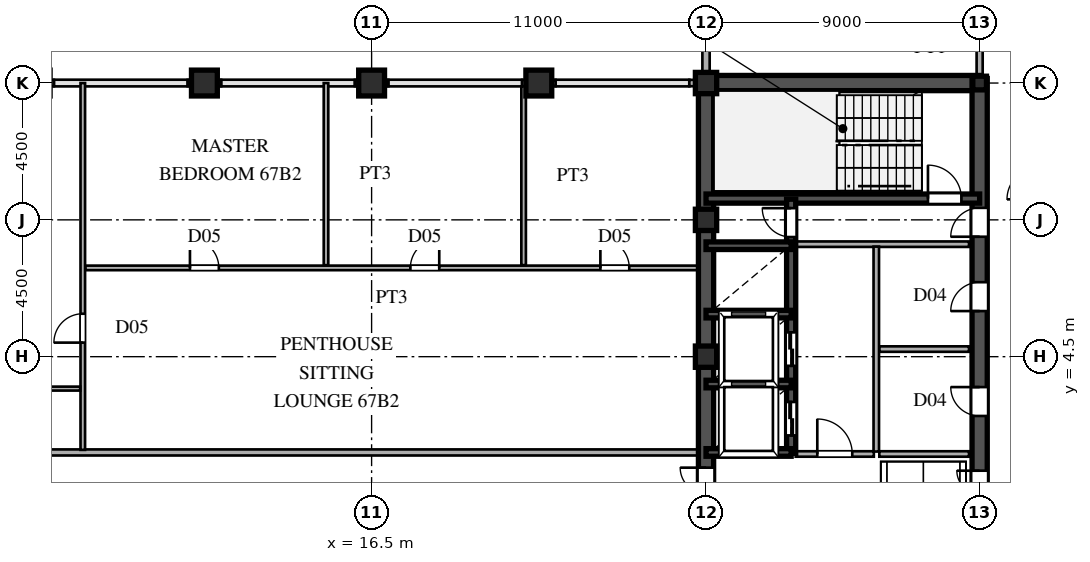
"""IFC4 building model, lengths in metres.
Left out: names, types, materials, properties, quantities, classifications, styles, units other than length and angle.
Written with IfcOpenShell. Run it as: python <this file> out.ifc"""

import sys

from ifc_helpers import new_model, si_unit, direction, frame, frame_2d, origin, origin_2d, place, context, subcontext, project, spatial, rectangle, hollow_rectangle, i_section, extrude, source, transform, mapped, element, fill, save


model = new_model("IFC4")
c1 = context("Model", 3, precision=1e-05, world=origin(), true_north=direction((0.0, 1.0)))
c2 = subcontext(c1, "Body", "Model", "MODEL_VIEW")
j1 = project(units=[si_unit("LENGTHUNIT", "METRE"), si_unit("PLANEANGLEUNIT", "RADIAN")], contexts=[c1])
p1 = place(None, origin())
s1 = spatial("IfcSite", under=j1, at=p1, CompositionType="ELEMENT")
p2 = place(p1, origin())
s2 = spatial("IfcBuilding", under=s1, at=p2, CompositionType="ELEMENT")
p3 = place(p2, frame((0.0, 0.0, 254.4)))
s3 = spatial("IfcBuildingStorey", under=s2, at=p3, CompositionType="ELEMENT", Elevation=254.4)
m1 = source(origin(), c2, "Body", "SweptSolid", [
    extrude(hollow_rectangle(XDim=0.7, YDim=0.7, WallThickness=0.03, at=origin_2d()), origin(), (0.0, 0.0, 1.0), 3.75),
])
for number, where, z_axis, x_axis in (
    (1, (27.5, 4.5, 0.0), (0.0, 0.0, 1.0), (1.0, 0.0, 0.0)),
    (2, (27.5, 9.0, 0.0), (0.0, 0.0, 1.0), (1.0, 0.0, 0.0)),
    (3, (27.5, 13.5, 0.0), (0.0, 0.0, 1.0), (1.0, 0.0, 0.0)),
):
    element("IfcColumn", number, at=place(p3, frame(where, z_axis=z_axis, x_axis=x_axis)), inside=s3, PredefinedType="COLUMN", context=c2, shape_type="MappedRepresentation", body=[
        mapped(m1, transform((0.0, 0.0, 0.0), scale=1.0)),
    ])
m2 = source(origin(), c2, "Body", "SweptSolid", [
    extrude(i_section(OverallWidth=0.45, OverallDepth=0.45, WebThickness=0.016, FlangeThickness=0.025, at=origin_2d()), origin(), (0.0, 0.0, 1.0), 3.75),
])
p4 = place(p3, frame((36.5, 13.5, 0.0), z_axis=(0.0, 0.0, 1.0), x_axis=(1.0, 0.0, 0.0)))
e4 = element("IfcColumn", 4, at=p4, inside=s3, PredefinedType="COLUMN", context=c2, shape_type="MappedRepresentation", body=[
    mapped(m2, transform((0.0, 0.0, 0.0), scale=1.0)),
])
m3 = source(origin(), c2, "Body", "SweptSolid", [
    extrude(hollow_rectangle(XDim=0.85, YDim=0.85, WallThickness=0.036, at=origin_2d()), origin(), (0.0, 0.0, 1.0), 3.75),
])
for number, where, z_axis, x_axis in (
    (5, (11.0, 13.5, 0.0), (0.0, 0.0, 1.0), (1.0, 0.0, 0.0)),
    (6, (16.5, 13.5, 0.0), (0.0, 0.0, 1.0), (1.0, 0.0, 0.0)),
    (7, (22.0, 13.5, 0.0), (0.0, 0.0, 1.0), (1.0, 0.0, 0.0)),
):
    element("IfcColumn", number, at=place(p3, frame(where, z_axis=z_axis, x_axis=x_axis)), inside=s3, PredefinedType="COLUMN", context=c2, shape_type="MappedRepresentation", body=[
        mapped(m3, transform((0.0, 0.0, 0.0), scale=1.0)),
    ])
p5 = place(p3, frame((27.5, 13.755, 0.0), z_axis=(0.0, 0.0, 1.0), x_axis=(0.0, 1.0, 0.0)))
e8 = element("IfcWall", 8, at=p5, inside=s3, PredefinedType="SOLIDWALL", context=c2, shape_type="SweptSolid", body=[
    extrude(rectangle(XDim=0.62, YDim=0.24, at=frame_2d((0.31, 0.0))), origin(), (0.0, 0.0, 1.0), 3.03),
])
p6 = place(p3, frame((27.5, 14.375, 0.0), z_axis=(0.0, 0.0, 1.0), x_axis=(0.0, 1.0, 0.0)))
e9 = element("IfcWall", 9, at=p6, inside=s3, PredefinedType="SOLIDWALL", context=c2, shape_type="SweptSolid", body=[
    extrude(rectangle(XDim=1.605, YDim=0.24, at=frame_2d((0.803, 0.0))), origin(), (0.0, 0.0, 1.0), 3.53),
])
for number, where, z_axis, x_axis in (
    (10, (4.95, 13.5, 0.0), (0.0, 0.0, 1.0), (1.0, 0.0, 0.0)),
    (11, (10.45, 13.5, 0.0), (0.0, 0.0, 1.0), (1.0, 0.0, 0.0)),
    (12, (15.95, 13.5, 0.0), (0.0, 0.0, 1.0), (1.0, 0.0, 0.0)),
    (13, (21.45, 13.5, 0.0), (0.0, 0.0, 1.0), (1.0, 0.0, 0.0)),
):
    element("IfcWall", number, at=place(p3, frame(where, z_axis=z_axis, x_axis=x_axis)), inside=s3, PredefinedType="SOLIDWALL", context=c2, shape_type="SweptSolid", body=[
        extrude(rectangle(XDim=1.1, YDim=0.21, at=frame_2d((0.55, 0.0))), origin(), (0.0, 0.0, 1.0), 3.03),
    ])
p7 = place(p3, frame((26.95, 13.5, 0.0), z_axis=(0.0, 0.0, 1.0), x_axis=(1.0, 0.0, 0.0)))
e14 = element("IfcWall", 14, at=p7, inside=s3, PredefinedType="SOLIDWALL", context=c2, shape_type="SweptSolid", body=[
    extrude(rectangle(XDim=0.54, YDim=0.21, at=frame_2d((0.27, 0.0))), origin(), (0.0, 0.0, 1.0), 3.03),
])
p8 = place(p3, frame((27.5, 1.3, 0.0), z_axis=(0.0, 0.0, 1.0), x_axis=(0.0, 1.0, 0.0)))
e15 = element("IfcWall", 15, at=p8, inside=s3, PredefinedType="SHEAR", context=c2, shape_type="SweptSolid", body=[
    extrude(rectangle(XDim=12.2, YDim=0.5, at=frame_2d((6.1, 0.0))), origin(), (0.0, 0.0, 1.0), 3.53),
])
p9 = place(p3, frame((27.5, -1.3, 0.0), z_axis=(0.0, 0.0, 1.0), x_axis=(0.0, 1.0, 0.0)))
e16 = element("IfcWall", 16, at=p9, inside=s3, PredefinedType="SHEAR", context=c2, shape_type="SweptSolid", body=[
    extrude(rectangle(XDim=2.6, YDim=0.5, at=frame_2d((1.3, 0.0))), origin(), (0.0, 0.0, 1.0), 3.53),
])
p10 = place(p9, frame((0.45, 0.0, 0.0)))
e17 = element("IfcOpeningElement", 17, at=p10, cuts=e16, PredefinedType="OPENING", context=c2, shape_type="SweptSolid", body=[
    extrude(rectangle(XDim=1.7, YDim=2.35, at=frame_2d((0.85, 1.175))), frame((0.0, 0.26, 0.0), z_axis=(0.0, -1.0, 0.0), x_axis=(1.0, 0.0, 0.0)), (0.0, 0.0, 1.0), 0.52),
])
p11 = place(p3, frame((27.5, 13.5, 0.0), z_axis=(0.0, 0.0, 1.0), x_axis=(1.0, 0.0, 0.0)))
e18 = element("IfcWall", 18, at=p11, inside=s3, PredefinedType="SHEAR", context=c2, shape_type="SweptSolid", body=[
    extrude(rectangle(XDim=9.0, YDim=0.5, at=frame_2d((4.5, 0.0))), origin(), (0.0, 0.0, 1.0), 3.53),
])
p12 = place(p3, frame((36.5, -1.3, 0.0), z_axis=(0.0, 0.0, 1.0), x_axis=(0.0, 1.0, 0.0)))
e19 = element("IfcWall", 19, at=p12, inside=s3, PredefinedType="SHEAR", context=c2, shape_type="SweptSolid", body=[
    extrude(rectangle(XDim=2.6, YDim=0.5, at=frame_2d((1.3, 0.0))), origin(), (0.0, 0.0, 1.0), 3.53),
])
p13 = place(p12, frame((0.55, 0.0, 0.0)))
e20 = element("IfcOpeningElement", 20, at=p13, cuts=e19, PredefinedType="OPENING", context=c2, shape_type="SweptSolid", body=[
    extrude(rectangle(XDim=1.5, YDim=2.3, at=frame_2d((0.75, 1.15))), frame((0.0, 0.26, 0.0), z_axis=(0.0, -1.0, 0.0), x_axis=(1.0, 0.0, 0.0)), (0.0, 0.0, 1.0), 0.52),
])
p14 = place(p3, frame((36.5, 8.2, 0.0), z_axis=(0.0, 0.0, 1.0), x_axis=(0.0, 1.0, 0.0)))
e21 = element("IfcWall", 21, at=p14, inside=s3, PredefinedType="SHEAR", context=c2, shape_type="SweptSolid", body=[
    extrude(rectangle(XDim=5.45, YDim=0.5, at=frame_2d((2.725, 0.0))), origin(), (0.0, 0.0, 1.0), 3.53),
])
p15 = place(p14, frame((0.245, 0.0, 0.0)))
e22 = element("IfcOpeningElement", 22, at=p15, cuts=e21, PredefinedType="OPENING", context=c2, shape_type="SweptSolid", body=[
    extrude(rectangle(XDim=0.95, YDim=2.15, at=frame_2d((0.475, 1.075))), frame((0.0, 0.26, 0.0), z_axis=(0.0, -1.0, 0.0), x_axis=(1.0, 0.0, 0.0)), (0.0, 0.0, 1.0), 0.52),
])
p16 = place(p3, frame((36.5, 1.3, 0.0), z_axis=(0.0, 0.0, 1.0), x_axis=(0.0, 1.0, 0.0)))
e23 = element("IfcWall", 23, at=p16, inside=s3, PredefinedType="SHEAR", context=c2, shape_type="SweptSolid", body=[
    extrude(rectangle(XDim=3.45, YDim=0.5, at=frame_2d((1.725, 0.0))), origin(), (0.0, 0.0, 1.0), 3.53),
])
p17 = place(p16, frame((1.25, 0.0, 0.0)))
e24 = element("IfcOpeningElement", 24, at=p17, cuts=e23, PredefinedType="OPENING", context=c2, shape_type="SweptSolid", body=[
    extrude(rectangle(XDim=0.95, YDim=2.15, at=frame_2d((0.475, 1.075))), frame((0.0, 0.26, 0.0), z_axis=(0.0, -1.0, 0.0), x_axis=(1.0, 0.0, 0.0)), (0.0, 0.0, 1.0), 0.52),
])
p18 = place(p3, frame((36.5, 4.75, 0.0), z_axis=(0.0, 0.0, 1.0), x_axis=(0.0, 1.0, 0.0)))
e25 = element("IfcWall", 25, at=p18, inside=s3, PredefinedType="SHEAR", context=c2, shape_type="SweptSolid", body=[
    extrude(rectangle(XDim=3.45, YDim=0.5, at=frame_2d((1.725, 0.0))), origin(), (0.0, 0.0, 1.0), 3.53),
])
p19 = place(p18, frame((1.25, 0.0, 0.0)))
e26 = element("IfcOpeningElement", 26, at=p19, cuts=e25, PredefinedType="OPENING", context=c2, shape_type="SweptSolid", body=[
    extrude(rectangle(XDim=0.95, YDim=2.15, at=frame_2d((0.475, 1.075))), frame((0.0, 0.26, 0.0), z_axis=(0.0, -1.0, 0.0), x_axis=(1.0, 0.0, 0.0)), (0.0, 0.0, 1.0), 0.52),
])
p20 = place(p3, frame((27.5, 9.7, 0.0), z_axis=(0.0, 0.0, 1.0), x_axis=(1.0, 0.0, 0.0)))
e27 = element("IfcWall", 27, at=p20, inside=s3, PredefinedType="SHEAR", context=c2, shape_type="SweptSolid", body=[
    extrude(rectangle(XDim=9.0, YDim=0.3, at=frame_2d((4.5, 0.0))), origin(), (0.0, 0.0, 1.0), 3.53),
])
p21 = place(p20, frame((7.3, 0.0, 0.0)))
e28 = element("IfcOpeningElement", 28, at=p21, cuts=e27, PredefinedType="OPENING", context=c2, shape_type="SweptSolid", body=[
    extrude(rectangle(XDim=1.1, YDim=2.2, at=frame_2d((0.55, 1.1))), frame((0.0, 0.16, 0.0), z_axis=(0.0, -1.0, 0.0), x_axis=(1.0, 0.0, 0.0)), (0.0, 0.0, 1.0), 0.32),
])
for number, where, z_axis, x_axis in (
    (29, (27.5, 1.35, 0.0), (0.0, 0.0, 1.0), (1.0, 0.0, 0.0)),
    (30, (27.5, 3.6, 0.0), (0.0, 0.0, 1.0), (1.0, 0.0, 0.0)),
    (31, (27.5, 5.9, 0.0), (0.0, 0.0, 1.0), (1.0, 0.0, 0.0)),
    (32, (27.5, 8.15, 0.0), (0.0, 0.0, 1.0), (1.0, 0.0, 0.0)),
):
    element("IfcWall", number, at=place(p3, frame(where, z_axis=z_axis, x_axis=x_axis)), inside=s3, PredefinedType="SHEAR", context=c2, shape_type="SweptSolid", body=[
        extrude(rectangle(XDim=2.8, YDim=0.25, at=frame_2d((1.4, 0.0))), origin(), (0.0, 0.0, 1.0), 3.53),
    ])
p22 = place(p3, frame((30.3, 1.32, 0.0), z_axis=(0.0, 0.0, 1.0), x_axis=(0.0, 1.0, 0.0)))
e33 = element("IfcWall", 33, at=p22, inside=s3, PredefinedType="SHEAR", context=c2, shape_type="SweptSolid", body=[
    extrude(rectangle(XDim=2.28, YDim=0.3, at=frame_2d((1.14, 0.0))), origin(), (0.0, 0.0, 1.0), 3.53),
])
p23 = place(p22, frame((0.59, 0.0, 0.0)))
e34 = element("IfcOpeningElement", 34, at=p23, cuts=e33, PredefinedType="OPENING", context=c2, shape_type="SweptSolid", body=[
    extrude(rectangle(XDim=1.1, YDim=2.2, at=frame_2d((0.55, 1.1))), frame((0.0, 0.16, 0.0), z_axis=(0.0, -1.0, 0.0), x_axis=(1.0, 0.0, 0.0)), (0.0, 0.0, 1.0), 0.32),
])
p24 = place(p3, frame((30.3, 3.6, 0.0), z_axis=(0.0, 0.0, 1.0), x_axis=(0.0, 1.0, 0.0)))
e35 = element("IfcWall", 35, at=p24, inside=s3, PredefinedType="SHEAR", context=c2, shape_type="SweptSolid", body=[
    extrude(rectangle(XDim=2.3, YDim=0.3, at=frame_2d((1.15, 0.0))), origin(), (0.0, 0.0, 1.0), 3.53),
])
p25 = place(p24, frame((0.6, 0.0, 0.0)))
e36 = element("IfcOpeningElement", 36, at=p25, cuts=e35, PredefinedType="OPENING", context=c2, shape_type="SweptSolid", body=[
    extrude(rectangle(XDim=1.1, YDim=2.2, at=frame_2d((0.55, 1.1))), frame((0.0, 0.16, 0.0), z_axis=(0.0, -1.0, 0.0), x_axis=(1.0, 0.0, 0.0)), (0.0, 0.0, 1.0), 0.32),
])
p26 = place(p3, frame((30.3, 5.9, 0.0), z_axis=(0.0, 0.0, 1.0), x_axis=(0.0, 1.0, 0.0)))
e37 = element("IfcWall", 37, at=p26, inside=s3, PredefinedType="SHEAR", context=c2, shape_type="SweptSolid", body=[
    extrude(rectangle(XDim=2.25, YDim=0.3, at=frame_2d((1.125, 0.0))), origin(), (0.0, 0.0, 1.0), 3.53),
])
p27 = place(p3, frame((30.3, 8.15, 0.0), z_axis=(0.0, 0.0, 1.0), x_axis=(0.0, 1.0, 0.0)))
e38 = element("IfcWall", 38, at=p27, inside=s3, PredefinedType="SHEAR", context=c2, shape_type="SweptSolid", body=[
    extrude(rectangle(XDim=1.53, YDim=0.3, at=frame_2d((0.765, 0.0))), origin(), (0.0, 0.0, 1.0), 3.53),
])
p28 = place(p27, frame((0.285, 0.0, 0.0)))
e39 = element("IfcOpeningElement", 39, at=p28, cuts=e38, PredefinedType="OPENING", context=c2, shape_type="SweptSolid", body=[
    extrude(rectangle(XDim=0.95, YDim=2.15, at=frame_2d((0.475, 1.075))), frame((0.0, 0.16, 0.0), z_axis=(0.0, -1.0, 0.0), x_axis=(1.0, 0.0, 0.0)), (0.0, 0.0, 1.0), 0.32),
])
p29 = place(p3, frame((30.45, 8.2, 0.0), z_axis=(0.0, 0.0, 1.0), x_axis=(1.0, 0.0, 0.0)))
e40 = element("IfcWall", 40, at=p29, inside=s3, PredefinedType="PARTITIONING", context=c2, shape_type="SweptSolid", body=[
    extrude(rectangle(XDim=5.7, YDim=0.18, at=frame_2d((2.85, 0.0))), origin(), (0.0, 0.0, 1.0), 3.53),
])
p30 = place(p3, frame((33.1, 1.38, 0.0), z_axis=(0.0, 0.0, 1.0), x_axis=(0.0, 1.0, 0.0)))
e41 = element("IfcWall", 41, at=p30, inside=s3, PredefinedType="PARTITIONING", context=c2, shape_type="SweptSolid", body=[
    extrude(rectangle(XDim=6.74, YDim=0.18, at=frame_2d((3.37, 0.0))), origin(), (0.0, 0.0, 1.0), 3.53),
])
p31 = place(p3, frame((30.45, 1.3, 0.0), z_axis=(0.0, 0.0, 1.0), x_axis=(1.0, 0.0, 0.0)))
e42 = element("IfcWall", 42, at=p31, inside=s3, PredefinedType="PARTITIONING", context=c2, shape_type="SweptSolid", body=[
    extrude(rectangle(XDim=2.57, YDim=0.18, at=frame_2d((1.285, 0.0))), origin(), (0.0, 0.0, 1.0), 3.53),
])
p32 = place(p31, frame((0.71, 0.0, 0.0)))
e43 = element("IfcOpeningElement", 43, at=p32, cuts=e42, PredefinedType="OPENING", context=c2, shape_type="SweptSolid", body=[
    extrude(rectangle(XDim=1.15, YDim=2.2, at=frame_2d((0.575, 1.1))), frame((0.0, 0.1, 0.0), z_axis=(0.0, -1.0, 0.0), x_axis=(1.0, 0.0, 0.0)), (0.0, 0.0, 1.0), 0.2),
])
for number, where, z_axis, x_axis in (
    (44, (33.2, 1.3, 0.0), (0.0, 0.0, 1.0), (1.0, 0.0, 0.0)),
    (45, (33.2, 4.75, 0.0), (0.0, 0.0, 1.0), (1.0, 0.0, 0.0)),
):
    element("IfcWall", number, at=place(p3, frame(where, z_axis=z_axis, x_axis=x_axis)), inside=s3, PredefinedType="PARTITIONING", context=c2, shape_type="SweptSolid", body=[
        extrude(rectangle(XDim=2.95, YDim=0.18, at=frame_2d((1.475, 0.0))), origin(), (0.0, 0.0, 1.0), 3.53),
    ])
p33 = place(p3, frame((-27.245, 1.35, 0.0), z_axis=(0.0, 0.0, 1.0), x_axis=(1.0, 0.0, 0.0)))
e46 = element("IfcWall", 46, at=p33, inside=s3, PredefinedType="PARTITIONING", context=c2, shape_type="SweptSolid", body=[
    extrude(rectangle(XDim=54.49, YDim=0.2, at=frame_2d((27.245, 0.0))), origin(), (0.0, 0.0, 1.0), 3.53),
])
p34 = place(p33, frame((24.97, 0.0, 0.0)))
e47 = element("IfcOpeningElement", 47, at=p34, cuts=e46, PredefinedType="OPENING", context=c2, shape_type="SweptSolid", body=[
    extrude(rectangle(XDim=1.05, YDim=2.25, at=frame_2d((0.525, 1.125))), frame((0.0, 0.11, 0.0), z_axis=(0.0, -1.0, 0.0), x_axis=(1.0, 0.0, 0.0)), (0.0, 0.0, 1.0), 0.22),
])
p35 = place(p3, frame((1.585, 3.45, 0.0), z_axis=(0.0, 0.0, 1.0), x_axis=(1.0, 0.0, 0.0)))
e48 = element("IfcWall", 48, at=p35, inside=s3, PredefinedType="PARTITIONING", context=c2, shape_type="SweptSolid", body=[
    extrude(rectangle(XDim=5.33, YDim=0.13, at=frame_2d((2.665, 0.0))), origin(), (0.0, 0.0, 1.0), 3.53),
])
p36 = place(p3, frame((7.085, 7.42, 0.0), z_axis=(0.0, 0.0, 1.0), x_axis=(1.0, 0.0, 0.0)))
e49 = element("IfcWall", 49, at=p36, inside=s3, PredefinedType="PARTITIONING", context=c2, shape_type="SweptSolid", body=[
    extrude(rectangle(XDim=20.16, YDim=0.15, at=frame_2d((10.08, 0.0))), origin(), (0.0, 0.0, 1.0), 3.53),
])
p37 = place(p36, frame((3.44, 0.0, 0.0)))
e50 = element("IfcOpeningElement", 50, at=p37, cuts=e49, PredefinedType="OPENING", context=c2, shape_type="SweptSolid", body=[
    extrude(rectangle(XDim=0.95, YDim=2.15, at=frame_2d((0.475, 1.075))), frame((0.0, 0.085, 0.0), z_axis=(0.0, -1.0, 0.0), x_axis=(1.0, 0.0, 0.0)), (0.0, 0.0, 1.0), 0.17),
])
p38 = place(p36, frame((10.69, 0.0, 0.0)))
e51 = element("IfcOpeningElement", 51, at=p38, cuts=e49, PredefinedType="OPENING", context=c2, shape_type="SweptSolid", body=[
    extrude(rectangle(XDim=0.95, YDim=2.15, at=frame_2d((0.475, 1.075))), frame((0.0, 0.085, 0.0), z_axis=(0.0, -1.0, 0.0), x_axis=(1.0, 0.0, 0.0)), (0.0, 0.0, 1.0), 0.17),
])
p39 = place(p36, frame((16.94, 0.0, 0.0)))
e52 = element("IfcOpeningElement", 52, at=p39, cuts=e49, PredefinedType="OPENING", context=c2, shape_type="SweptSolid", body=[
    extrude(rectangle(XDim=0.95, YDim=2.15, at=frame_2d((0.475, 1.075))), frame((0.0, 0.085, 0.0), z_axis=(0.0, -1.0, 0.0), x_axis=(1.0, 0.0, 0.0)), (0.0, 0.0, 1.0), 0.17),
])
p40 = place(p3, frame((7.0, 1.435, 0.0), z_axis=(0.0, 0.0, 1.0), x_axis=(0.0, 1.0, 0.0)))
e53 = element("IfcWall", 53, at=p40, inside=s3, PredefinedType="PARTITIONING", context=c2, shape_type="SweptSolid", body=[
    extrude(rectangle(XDim=12.065, YDim=0.15, at=frame_2d((6.032, 0.0))), origin(), (0.0, 0.0, 1.0), 3.53),
])
p41 = place(p40, frame((3.528, 0.0, 0.0)))
e54 = element("IfcOpeningElement", 54, at=p41, cuts=e53, PredefinedType="OPENING", context=c2, shape_type="SweptSolid", body=[
    extrude(rectangle(XDim=0.95, YDim=2.15, at=frame_2d((0.475, 1.075))), frame((0.0, 0.085, 0.0), z_axis=(0.0, -1.0, 0.0), x_axis=(1.0, 0.0, 0.0)), (0.0, 0.0, 1.0), 0.17),
])
p42 = place(p3, frame((15.0, 7.51, 0.0), z_axis=(0.0, 0.0, 1.0), x_axis=(0.0, 1.0, 0.0)))
e55 = element("IfcWall", 55, at=p42, inside=s3, PredefinedType="PARTITIONING", context=c2, shape_type="SweptSolid", body=[
    extrude(rectangle(XDim=5.99, YDim=0.15, at=frame_2d((2.995, 0.0))), origin(), (0.0, 0.0, 1.0), 3.53),
])
p43 = place(p3, frame((21.5, 7.51, 0.0), z_axis=(0.0, 0.0, 1.0), x_axis=(0.0, 1.0, 0.0)))
e56 = element("IfcWall", 56, at=p43, inside=s3, PredefinedType="PARTITIONING", context=c2, shape_type="SweptSolid", body=[
    extrude(rectangle(XDim=5.88, YDim=0.15, at=frame_2d((2.94, 0.0))), origin(), (0.0, 0.0, 1.0), 3.53),
])
p44 = place(p3, frame((36.5, 13.755, 0.0), z_axis=(0.0, 0.0, 1.0), x_axis=(0.0, 1.0, 0.0)))
e57 = element("IfcWall", 57, at=p44, inside=s3, PredefinedType="PARTITIONING", context=c2, shape_type="SweptSolid", body=[
    extrude(rectangle(XDim=1.76, YDim=0.2, at=frame_2d((0.88, 0.0))), origin(), (0.0, 0.0, 1.0), 2.93),
])
m4 = source(origin(), c2, "Body", "SweptSolid", [
    extrude(rectangle(XDim=1.7, YDim=2.35, at=frame_2d((0.85, 1.175))), frame((0.0, 0.025, 0.0), z_axis=(0.0, -1.0, 0.0), x_axis=(1.0, 0.0, 0.0)), (0.0, 0.0, 1.0), 0.05),
])
p45 = place(p10, origin())
e58 = element("IfcDoor", 58, at=p45, inside=s3, OperationType="DOUBLE_SWING_LEFT", PredefinedType="DOOR", context=c2, shape_type="MappedRepresentation", body=[
    mapped(m4, transform((0.0, 0.0, 0.0), scale=1.0)),
])
fill(e17, e58)
m5 = source(origin(), c2, "Body", "SweptSolid", [
    extrude(rectangle(XDim=1.5, YDim=2.3, at=frame_2d((0.75, 1.15))), frame((0.0, 0.025, 0.0), z_axis=(0.0, -1.0, 0.0), x_axis=(1.0, 0.0, 0.0)), (0.0, 0.0, 1.0), 0.05),
])
p46 = place(p13, origin())
e59 = element("IfcDoor", 59, at=p46, inside=s3, OperationType="DOUBLE_SWING_LEFT", PredefinedType="DOOR", context=c2, shape_type="MappedRepresentation", body=[
    mapped(m5, transform((0.0, 0.0, 0.0), scale=1.0)),
])
fill(e20, e59)
m6 = source(origin(), c2, "Body", "SweptSolid", [
    extrude(rectangle(XDim=0.95, YDim=2.15, at=frame_2d((0.475, 1.075))), frame((0.0, 0.025, 0.0), z_axis=(0.0, -1.0, 0.0), x_axis=(1.0, 0.0, 0.0)), (0.0, 0.0, 1.0), 0.05),
])
p47 = place(p15, origin())
e60 = element("IfcDoor", 60, at=p47, inside=s3, OperationType="SINGLE_SWING_LEFT", PredefinedType="DOOR", context=c2, shape_type="MappedRepresentation", body=[
    mapped(m6, transform((0.0, 0.0, 0.0), scale=1.0)),
])
fill(e22, e60)
p48 = place(p17, origin())
e61 = element("IfcDoor", 61, at=p48, inside=s3, OperationType="SINGLE_SWING_RIGHT", PredefinedType="DOOR", context=c2, shape_type="MappedRepresentation", body=[
    mapped(m6, transform((0.0, 0.0, 0.0), scale=1.0)),
])
fill(e24, e61)
p49 = place(p19, origin())
e62 = element("IfcDoor", 62, at=p49, inside=s3, OperationType="SINGLE_SWING_LEFT", PredefinedType="DOOR", context=c2, shape_type="MappedRepresentation", body=[
    mapped(m6, transform((0.0, 0.0, 0.0), scale=1.0)),
])
fill(e26, e62)
m7 = source(origin(), c2, "Body", "SweptSolid", [
    extrude(rectangle(XDim=1.1, YDim=2.2, at=frame_2d((0.55, 1.1))), frame((0.0, 0.025, 0.0), z_axis=(0.0, -1.0, 0.0), x_axis=(1.0, 0.0, 0.0)), (0.0, 0.0, 1.0), 0.05),
])
p50 = place(p21, origin())
e63 = element("IfcDoor", 63, at=p50, inside=s3, OperationType="SINGLE_SWING_LEFT", PredefinedType="DOOR", context=c2, shape_type="MappedRepresentation", body=[
    mapped(m7, transform((0.0, 0.0, 0.0), scale=1.0)),
])
fill(e28, e63)
m8 = source(origin(), c2, "Body", "SweptSolid", [
    extrude(rectangle(XDim=1.1, YDim=2.2, at=frame_2d((0.55, 1.1))), frame((0.0, 0.025, 0.0), z_axis=(0.0, -1.0, 0.0), x_axis=(1.0, 0.0, 0.0)), (0.0, 0.0, 1.0), 0.05),
])
p51 = place(p23, origin())
e64 = element("IfcDoor", 64, at=p51, inside=s3, OperationType="DOUBLE_DOOR_SLIDING", PredefinedType="DOOR", context=c2, shape_type="MappedRepresentation", body=[
    mapped(m8, transform((0.0, 0.0, 0.0), scale=1.0)),
])
fill(e34, e64)
p52 = place(p25, origin())
e65 = element("IfcDoor", 65, at=p52, inside=s3, OperationType="DOUBLE_DOOR_SLIDING", PredefinedType="DOOR", context=c2, shape_type="MappedRepresentation", body=[
    mapped(m8, transform((0.0, 0.0, 0.0), scale=1.0)),
])
fill(e36, e65)
p53 = place(p28, origin())
e66 = element("IfcDoor", 66, at=p53, inside=s3, OperationType="SINGLE_SWING_RIGHT", PredefinedType="DOOR", context=c2, shape_type="MappedRepresentation", body=[
    mapped(m6, transform((0.0, 0.0, 0.0), scale=1.0)),
])
fill(e39, e66)
m9 = source(origin(), c2, "Body", "SweptSolid", [
    extrude(rectangle(XDim=1.15, YDim=2.2, at=frame_2d((0.575, 1.1))), frame((0.0, 0.025, 0.0), z_axis=(0.0, -1.0, 0.0), x_axis=(1.0, 0.0, 0.0)), (0.0, 0.0, 1.0), 0.05),
])
p54 = place(p32, origin())
e67 = element("IfcDoor", 67, at=p54, inside=s3, OperationType="SINGLE_SWING_LEFT", PredefinedType="DOOR", context=c2, shape_type="MappedRepresentation", body=[
    mapped(m9, transform((0.0, 0.0, 0.0), scale=1.0)),
])
fill(e43, e67)
m10 = source(origin(), c2, "Body", "SweptSolid", [
    extrude(rectangle(XDim=0.95, YDim=2.15, at=frame_2d((0.475, 1.075))), frame((0.0, 0.025, 0.0), z_axis=(0.0, -1.0, 0.0), x_axis=(1.0, 0.0, 0.0)), (0.0, 0.0, 1.0), 0.05),
])
p55 = place(p37, origin())
e68 = element("IfcDoor", 68, at=p55, inside=s3, OperationType="SINGLE_SWING_LEFT", PredefinedType="DOOR", context=c2, shape_type="MappedRepresentation", body=[
    mapped(m10, transform((0.0, 0.0, 0.0), scale=1.0)),
])
fill(e50, e68)
p56 = place(p38, origin())
e69 = element("IfcDoor", 69, at=p56, inside=s3, OperationType="SINGLE_SWING_RIGHT", PredefinedType="DOOR", context=c2, shape_type="MappedRepresentation", body=[
    mapped(m10, transform((0.0, 0.0, 0.0), scale=1.0)),
])
fill(e51, e69)
p57 = place(p39, origin())
e70 = element("IfcDoor", 70, at=p57, inside=s3, OperationType="SINGLE_SWING_LEFT", PredefinedType="DOOR", context=c2, shape_type="MappedRepresentation", body=[
    mapped(m10, transform((0.0, 0.0, 0.0), scale=1.0)),
])
fill(e52, e70)
p58 = place(p41, origin())
e71 = element("IfcDoor", 71, at=p58, inside=s3, OperationType="SINGLE_SWING_LEFT", PredefinedType="DOOR", context=c2, shape_type="MappedRepresentation", body=[
    mapped(m10, transform((0.0, 0.0, 0.0), scale=1.0)),
])
fill(e54, e71)
save(model, sys.argv[1])
